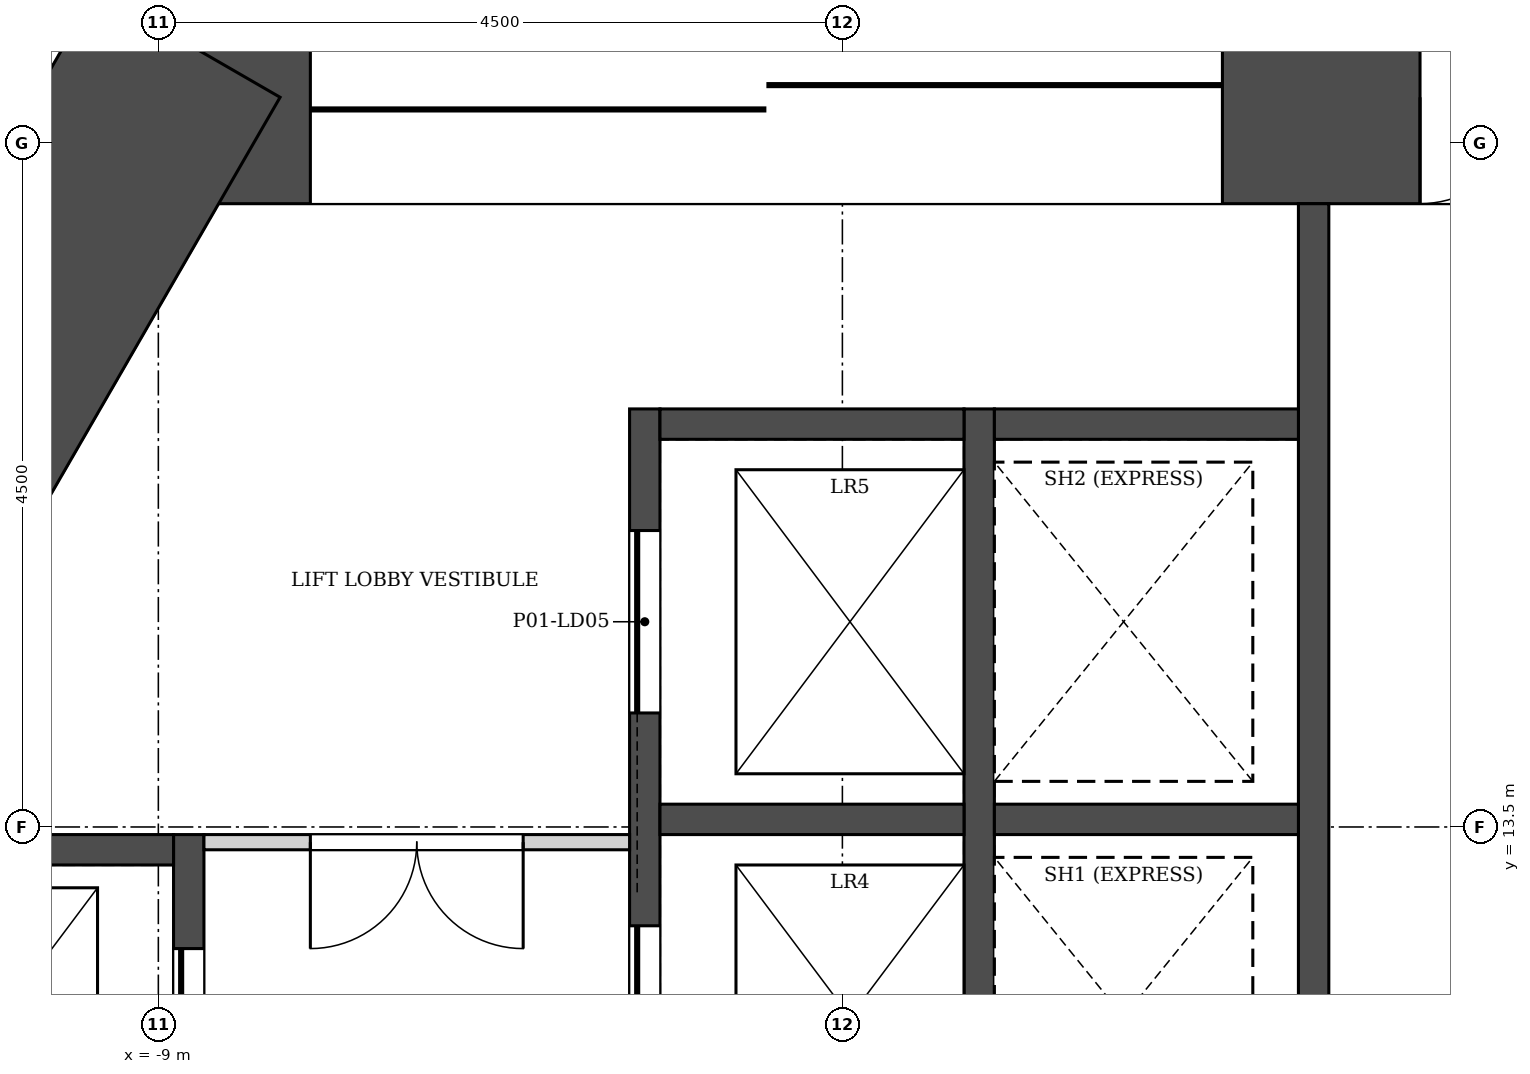
"""IFC4 building model, lengths in metres.
Left out: names, types, materials, properties, quantities, classifications, styles, units other than length and angle.
Written with IfcOpenShell. Run it as: python <this file> out.ifc"""

import sys

from ifc_helpers import new_model, si_unit, direction, frame, frame_2d, origin, place, context, subcontext, project, spatial, rectangle, extrude, element, fill, save


model = new_model("IFC4")
c1 = context("Model", 3, precision=1e-05, world=origin(), true_north=direction((0.0, 1.0)))
c2 = subcontext(c1, "Body", "Model", "MODEL_VIEW")
j1 = project(units=[si_unit("LENGTHUNIT", "METRE"), si_unit("PLANEANGLEUNIT", "RADIAN")], contexts=[c1])
p1 = place(None, origin())
s1 = spatial("IfcSite", under=j1, at=p1, CompositionType="ELEMENT")
p2 = place(p1, origin())
s2 = spatial("IfcBuilding", under=s1, at=p2, CompositionType="ELEMENT")
p3 = place(p2, frame((0.0, 0.0, 8.0)))
s3 = spatial("IfcBuildingStorey", under=s2, at=p3, CompositionType="ELEMENT", Elevation=8.0)
p4 = place(p3, frame((9.412, 18.3, 0.0), z_axis=(0.0, 0.0, 1.0), x_axis=(-1.0, 0.0, 0.0)))
e1 = element("IfcWall", 1, at=p4, inside=s3, PredefinedType="SHEAR", context=c2, shape_type="SweptSolid", body=[
    extrude(rectangle(XDim=18.823, YDim=1.4, at=frame_2d((9.412, 0.0))), origin(), (0.0, 0.0, 1.0), 6.0),
])
p5 = place(p4, frame((8.711, 0.0, 0.0)))
e2 = element("IfcOpeningElement", 2, at=p5, cuts=e1, PredefinedType="OPENING", context=c2, shape_type="SweptSolid", body=[
    extrude(rectangle(XDim=1.4, YDim=2.1, at=frame_2d((0.7, 1.05))), frame((0.0, 0.71, 0.0), z_axis=(0.0, -1.0, 0.0), x_axis=(1.0, 0.0, 0.0)), (0.0, 0.0, 1.0), 1.42),
])
p6 = place(p4, frame((11.412, 0.0, 0.0)))
e3 = element("IfcOpeningElement", 3, at=p6, cuts=e1, PredefinedType="OPENING", context=c2, shape_type="SweptSolid", body=[
    extrude(rectangle(XDim=6.0, YDim=2.4, at=frame_2d((3.0, 1.2))), frame((0.0, 0.71, 0.0), z_axis=(0.0, -1.0, 0.0), x_axis=(1.0, 0.0, 0.0)), (0.0, 0.0, 1.0), 1.42),
])
p7 = place(p4, frame((1.412, 0.0, 0.0)))
e4 = element("IfcOpeningElement", 4, at=p7, cuts=e1, PredefinedType="OPENING", context=c2, shape_type="SweptSolid", body=[
    extrude(rectangle(XDim=6.0, YDim=2.4, at=frame_2d((3.0, 1.2))), frame((0.0, 0.71, 0.0), z_axis=(0.0, -1.0, 0.0), x_axis=(1.0, 0.0, 0.0)), (0.0, 0.0, 1.0), 1.42),
])
p8 = place(p3, frame((-8.805, 18.65, 0.0), z_axis=(0.0, 0.0, 1.0), x_axis=(-0.50000187635, -0.866024320471, 0.0)))
e5 = element("IfcWall", 5, at=p8, inside=s3, PredefinedType="SHEAR", context=c2, shape_type="SweptSolid", body=[
    extrude(rectangle(XDim=9.177, YDim=1.4, at=frame_2d((4.588, 0.0))), origin(), (0.0, 0.0, 1.0), 6.0),
])
p9 = place(p3, frame((-8.8, 8.25, -0.3), z_axis=(0.0, 0.0, 1.0), x_axis=(0.0, 1.0, 0.0)))
e6 = element("IfcWall", 6, at=p9, inside=s3, PredefinedType="SOLIDWALL", context=c2, shape_type="SweptSolid", body=[
    extrude(rectangle(XDim=5.2, YDim=0.2, at=frame_2d((2.6, 0.0))), origin(), (0.0, 0.0, 1.0), 6.0),
])
p10 = place(p9, frame((0.75, 0.0, 0.3)))
e7 = element("IfcOpeningElement", 7, at=p10, cuts=e6, PredefinedType="OPENING", context=c2, shape_type="SweptSolid", body=[
    extrude(rectangle(XDim=1.2, YDim=2.1, at=frame_2d((0.6, 1.05))), frame((0.0, 0.11, 0.0), z_axis=(0.0, -1.0, 0.0), x_axis=(1.0, 0.0, 0.0)), (0.0, 0.0, 1.0), 0.22),
])
p11 = place(p9, frame((3.25, 0.0, 0.3)))
e8 = element("IfcOpeningElement", 8, at=p11, cuts=e6, PredefinedType="OPENING", context=c2, shape_type="SweptSolid", body=[
    extrude(rectangle(XDim=1.2, YDim=2.1, at=frame_2d((0.6, 1.05))), frame((0.0, 0.11, 0.0), z_axis=(0.0, -1.0, 0.0), x_axis=(1.0, 0.0, 0.0)), (0.0, 0.0, 1.0), 0.22),
])
p12 = place(p3, frame((-5.8, 8.25, -0.3), z_axis=(0.0, 0.0, 1.0), x_axis=(0.0, 1.0, 0.0)))
e9 = element("IfcWall", 9, at=p12, inside=s3, PredefinedType="SOLIDWALL", context=c2, shape_type="SweptSolid", body=[
    extrude(rectangle(XDim=8.0, YDim=0.2, at=frame_2d((4.0, 0.0))), origin(), (0.0, 0.0, 1.0), 6.0),
])
p13 = place(p12, frame((0.8, 0.0, 0.3)))
e10 = element("IfcOpeningElement", 10, at=p13, cuts=e9, PredefinedType="OPENING", context=c2, shape_type="SweptSolid", body=[
    extrude(rectangle(XDim=1.2, YDim=2.1, at=frame_2d((0.6, 1.05))), frame((0.0, 0.11, 0.0), z_axis=(0.0, -1.0, 0.0), x_axis=(1.0, 0.0, 0.0)), (0.0, 0.0, 1.0), 0.22),
])
p14 = place(p12, frame((3.4, 0.0, 0.3)))
e11 = element("IfcOpeningElement", 11, at=p14, cuts=e9, PredefinedType="OPENING", context=c2, shape_type="SweptSolid", body=[
    extrude(rectangle(XDim=1.2, YDim=2.1, at=frame_2d((0.6, 1.05))), frame((0.0, 0.11, 0.0), z_axis=(0.0, -1.0, 0.0), x_axis=(1.0, 0.0, 0.0)), (0.0, 0.0, 1.0), 0.22),
])
p15 = place(p12, frame((6.0, 0.0, 0.3)))
e12 = element("IfcOpeningElement", 12, at=p15, cuts=e9, PredefinedType="OPENING", context=c2, shape_type="SweptSolid", body=[
    extrude(rectangle(XDim=1.2, YDim=2.1, at=frame_2d((0.6, 1.05))), frame((0.0, 0.11, 0.0), z_axis=(0.0, -1.0, 0.0), x_axis=(1.0, 0.0, 0.0)), (0.0, 0.0, 1.0), 0.22),
])
p16 = place(p3, frame((-3.6, 8.45, -0.3), z_axis=(0.0, 0.0, 1.0), x_axis=(0.0, 1.0, 0.0)))
e13 = element("IfcWall", 13, at=p16, inside=s3, PredefinedType="SOLIDWALL", context=c2, shape_type="SweptSolid", body=[
    extrude(rectangle(XDim=7.8, YDim=0.2, at=frame_2d((3.9, 0.0))), origin(), (0.0, 0.0, 1.0), 6.0),
])
p17 = place(p3, frame((-1.4, 5.85, -0.3), z_axis=(0.0, 0.0, 1.0), x_axis=(0.0, 1.0, 0.0)))
e14 = element("IfcWall", 14, at=p17, inside=s3, PredefinedType="SOLIDWALL", context=c2, shape_type="SweptSolid", body=[
    extrude(rectangle(XDim=11.75, YDim=0.2, at=frame_2d((5.875, 0.0))), origin(), (0.0, 0.0, 1.0), 6.0),
])
p18 = place(p17, frame((3.2, 0.0, 0.3)))
e15 = element("IfcOpeningElement", 15, at=p18, cuts=e14, PredefinedType="OPENING", context=c2, shape_type="SweptSolid", body=[
    extrude(rectangle(XDim=1.2, YDim=2.1, at=frame_2d((0.6, 1.05))), frame((0.0, 0.11, 0.0), z_axis=(0.0, -1.0, 0.0), x_axis=(1.0, 0.0, 0.0)), (0.0, 0.0, 1.0), 0.22),
])
p19 = place(p17, frame((0.65, 0.0, 0.3)))
e16 = element("IfcOpeningElement", 16, at=p19, cuts=e14, PredefinedType="OPENING", context=c2, shape_type="SweptSolid", body=[
    extrude(rectangle(XDim=1.1, YDim=2.1, at=frame_2d((0.55, 1.05))), frame((0.0, 0.11, 0.0), z_axis=(0.0, -1.0, 0.0), x_axis=(1.0, 0.0, 0.0)), (0.0, 0.0, 1.0), 0.22),
])
for number, where, z_axis, x_axis in (
    (17, (-10.9, 13.35, -0.3), (0.0, 0.0, 1.0), (1.0, 0.0, 0.0)),
    (18, (-5.7, 13.55, -0.3), (0.0, 0.0, 1.0), (1.0, 0.0, 0.0)),
    (19, (-5.7, 16.15, -0.3), (0.0, 0.0, 1.0), (1.0, 0.0, 0.0)),
    (20, (-3.5, 13.55, -0.3), (0.0, 0.0, 1.0), (1.0, 0.0, 0.0)),
    (21, (-3.5, 16.15, -0.3), (0.0, 0.0, 1.0), (1.0, 0.0, 0.0)),
):
    element("IfcWall", number, at=place(p3, frame(where, z_axis=z_axis, x_axis=x_axis)), inside=s3, PredefinedType="SOLIDWALL", context=c2, shape_type="SweptSolid", body=[
        extrude(rectangle(XDim=2.0, YDim=0.2, at=frame_2d((1.0, 0.0))), origin(), (0.0, 0.0, 1.0), 6.0),
    ])
p20 = place(p3, frame((-8.7, 13.4, 0.0), z_axis=(0.0, 0.0, 1.0), x_axis=(1.0, 0.0, 0.0)))
e22 = element("IfcWall", 22, at=p20, inside=s3, PredefinedType="PARTITIONING", context=c2, shape_type="SweptSolid", body=[
    extrude(rectangle(XDim=2.8, YDim=0.1, at=frame_2d((1.4, 0.0))), origin(), (0.0, 0.0, 1.0), 5.7),
])
p21 = place(p20, frame((0.7, 0.0, 0.0)))
e23 = element("IfcOpeningElement", 23, at=p21, cuts=e22, PredefinedType="OPENING", context=c2, shape_type="SweptSolid", body=[
    extrude(rectangle(XDim=1.4, YDim=2.1, at=frame_2d((0.7, 1.05))), frame((0.0, 0.06, 0.0), z_axis=(0.0, -1.0, 0.0), x_axis=(1.0, 0.0, 0.0)), (0.0, 0.0, 1.0), 0.12),
])
p22 = place(p11, origin())
e24 = element("IfcDoor", 24, at=p22, inside=s3, OperationType="SLIDING_TO_LEFT", PredefinedType="DOOR", context=c2, shape_type="SweptSolid", body=[
    extrude(rectangle(XDim=1.2, YDim=2.1, at=frame_2d((0.6, 1.05))), frame((0.0, 0.025, 0.0), z_axis=(0.0, -1.0, 0.0), x_axis=(1.0, 0.0, 0.0)), (0.0, 0.0, 1.0), 0.05),
])
fill(e8, e24)
p23 = place(p14, origin())
e25 = element("IfcDoor", 25, at=p23, inside=s3, OperationType="SLIDING_TO_LEFT", PredefinedType="DOOR", context=c2, shape_type="SweptSolid", body=[
    extrude(rectangle(XDim=1.2, YDim=2.1, at=frame_2d((0.6, 1.05))), frame((0.0, 0.025, 0.0), z_axis=(0.0, -1.0, 0.0), x_axis=(1.0, 0.0, 0.0)), (0.0, 0.0, 1.0), 0.05),
])
fill(e11, e25)
p24 = place(p15, origin())
e26 = element("IfcDoor", 26, at=p24, inside=s3, OperationType="SLIDING_TO_LEFT", PredefinedType="DOOR", context=c2, shape_type="SweptSolid", body=[
    extrude(rectangle(XDim=1.2, YDim=2.1, at=frame_2d((0.6, 1.05))), frame((0.0, 0.025, 0.0), z_axis=(0.0, -1.0, 0.0), x_axis=(1.0, 0.0, 0.0)), (0.0, 0.0, 1.0), 0.05),
])
fill(e12, e26)
p25 = place(p21, frame((1.4, 0.0, 0.0), z_axis=(0.0, 0.0, 1.0), x_axis=(-1.0, 0.0, 0.0)))
e27 = element("IfcDoor", 27, at=p25, inside=s3, OperationType="DOUBLE_DOOR_SINGLE_SWING", PredefinedType="DOOR", context=c2, shape_type="SweptSolid", body=[
    extrude(rectangle(XDim=1.4, YDim=2.1, at=frame_2d((0.7, 1.05))), frame((0.0, 0.025, 0.0), z_axis=(0.0, -1.0, 0.0), x_axis=(1.0, 0.0, 0.0)), (0.0, 0.0, 1.0), 0.05),
])
fill(e23, e27)
p26 = place(p5, origin())
e28 = element("IfcDoor", 28, at=p26, inside=s3, OperationType="DOUBLE_DOOR_SINGLE_SWING", PredefinedType="DOOR", context=c2, shape_type="SweptSolid", body=[
    extrude(rectangle(XDim=1.4, YDim=2.1, at=frame_2d((0.7, 1.05))), frame((0.0, 0.025, 0.0), z_axis=(0.0, -1.0, 0.0), x_axis=(1.0, 0.0, 0.0)), (0.0, 0.0, 1.0), 0.05),
])
fill(e2, e28)
p27 = place(p6, origin())
e29 = element("IfcDoor", 29, at=p27, inside=s3, OperationType="DOUBLE_DOOR_SLIDING", PredefinedType="DOOR", context=c2, shape_type="SweptSolid", body=[
    extrude(rectangle(XDim=6.0, YDim=2.4, at=frame_2d((3.0, 1.2))), frame((0.0, 0.025, 0.0), z_axis=(0.0, -1.0, 0.0), x_axis=(1.0, 0.0, 0.0)), (0.0, 0.0, 1.0), 0.05),
])
fill(e3, e29)
save(model, sys.argv[1])
